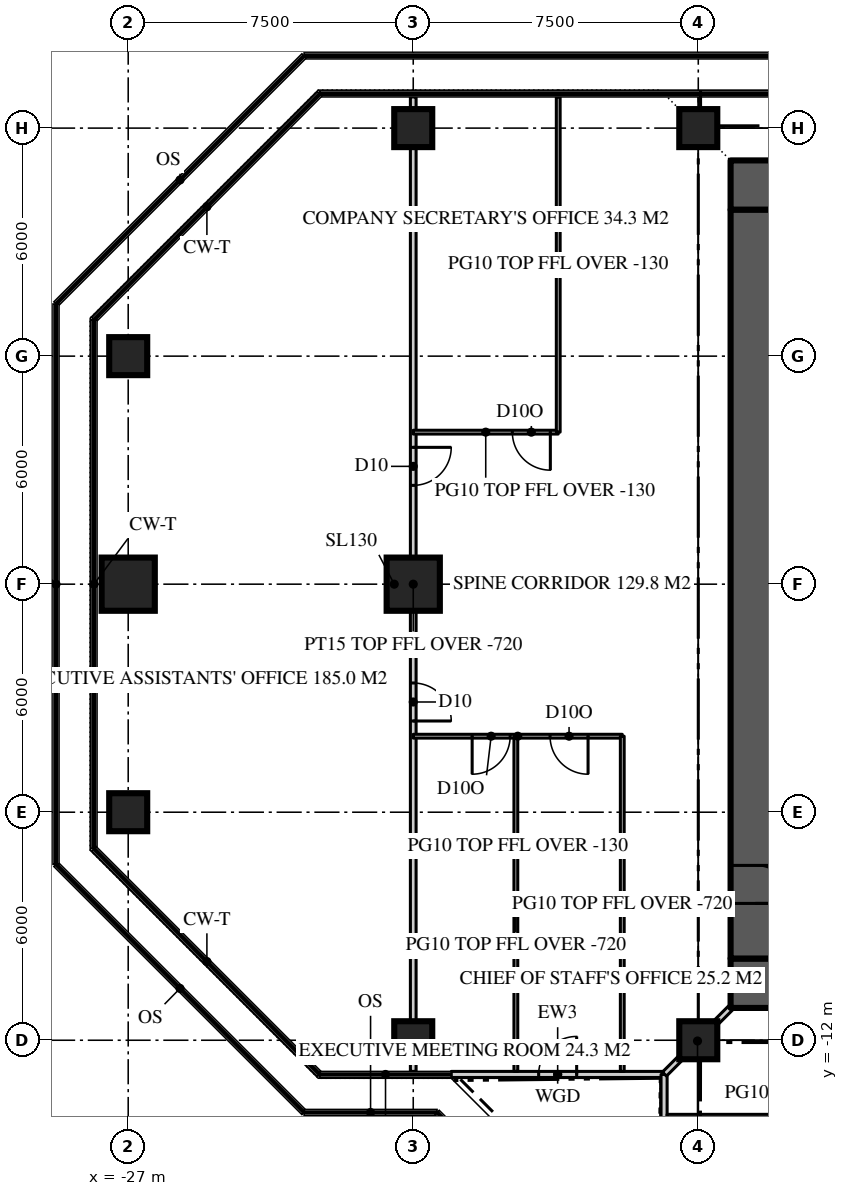
"""IFC4 building model, lengths in metres.
Left out: names, types, materials, properties, quantities, classifications, styles, units other than length and angle.
Written with IfcOpenShell. Run it as: python <this file> out.ifc"""

import sys

from ifc_helpers import new_model, si_unit, direction, frame, frame_2d, origin, origin_2d, place, context, subcontext, project, spatial, rectangle, extrude, element, fill, save


model = new_model("IFC4")
c1 = context("Model", 3, precision=1e-05, world=origin(), true_north=direction((0.0, 1.0)))
c2 = subcontext(c1, "Body", "Model", "MODEL_VIEW")
j1 = project(units=[si_unit("LENGTHUNIT", "METRE"), si_unit("PLANEANGLEUNIT", "RADIAN")], contexts=[c1])
p1 = place(None, origin())
s1 = spatial("IfcSite", under=j1, at=p1, CompositionType="ELEMENT")
p2 = place(p1, origin())
s2 = spatial("IfcBuilding", under=s1, at=p2, CompositionType="ELEMENT")
p3 = place(p2, frame((0.0, 0.0, 294.6)))
s3 = spatial("IfcBuildingStorey", under=s2, at=p3, CompositionType="ELEMENT", Elevation=294.6)
p4 = place(p3, frame((-11.15, 10.5, 0.0), z_axis=(0.0, 0.0, 1.0), x_axis=(1.0, 0.0, 0.0)))
e1 = element("IfcWall", 1, at=p4, inside=s3, PredefinedType="SHEAR", context=c2, shape_type="SweptSolid", body=[
    extrude(rectangle(XDim=22.3, YDim=1.3, at=frame_2d((11.15, 0.0))), origin(), (0.0, 0.0, 1.0), 3.9),
])
p5 = place(p4, frame((4.25, 0.0, 0.0)))
e2 = element("IfcOpeningElement", 2, at=p5, cuts=e1, PredefinedType="OPENING", context=c2, shape_type="SweptSolid", body=[
    extrude(rectangle(XDim=1.8, YDim=2.2, at=frame_2d((0.9, 1.1))), frame((0.0, 0.66, 0.0), z_axis=(0.0, -1.0, 0.0), x_axis=(1.0, 0.0, 0.0)), (0.0, 0.0, 1.0), 1.32),
])
p6 = place(p4, frame((16.25, 0.0, 0.0)))
e3 = element("IfcOpeningElement", 3, at=p6, cuts=e1, PredefinedType="OPENING", context=c2, shape_type="SweptSolid", body=[
    extrude(rectangle(XDim=1.8, YDim=2.2, at=frame_2d((0.9, 1.1))), frame((0.0, 0.66, 0.0), z_axis=(0.0, -1.0, 0.0), x_axis=(1.0, 0.0, 0.0)), (0.0, 0.0, 1.0), 1.32),
])
p7 = place(p3, frame((11.15, -10.5, 0.0), z_axis=(0.0, 0.0, 1.0), x_axis=(-1.0, 0.0, 0.0)))
e4 = element("IfcWall", 4, at=p7, inside=s3, PredefinedType="SHEAR", context=c2, shape_type="SweptSolid", body=[
    extrude(rectangle(XDim=22.3, YDim=1.3, at=frame_2d((11.15, 0.0))), origin(), (0.0, 0.0, 1.0), 3.9),
])
p8 = place(p7, frame((16.25, 0.0, 0.0)))
e5 = element("IfcOpeningElement", 5, at=p8, cuts=e4, PredefinedType="OPENING", context=c2, shape_type="SweptSolid", body=[
    extrude(rectangle(XDim=1.8, YDim=2.2, at=frame_2d((0.9, 1.1))), frame((0.0, 0.66, 0.0), z_axis=(0.0, -1.0, 0.0), x_axis=(1.0, 0.0, 0.0)), (0.0, 0.0, 1.0), 1.32),
])
p9 = place(p7, frame((4.25, 0.0, 0.0)))
e6 = element("IfcOpeningElement", 6, at=p9, cuts=e4, PredefinedType="OPENING", context=c2, shape_type="SweptSolid", body=[
    extrude(rectangle(XDim=1.8, YDim=2.2, at=frame_2d((0.9, 1.1))), frame((0.0, 0.66, 0.0), z_axis=(0.0, -1.0, 0.0), x_axis=(1.0, 0.0, 0.0)), (0.0, 0.0, 1.0), 1.32),
])
p10 = place(p3, frame((-10.5, 9.85, 0.0), z_axis=(0.0, 0.0, 1.0), x_axis=(0.0, -1.0, 0.0)))
e7 = element("IfcWall", 7, at=p10, inside=s3, PredefinedType="SHEAR", context=c2, shape_type="SweptSolid", body=[
    extrude(rectangle(XDim=19.7, YDim=1.3, at=frame_2d((9.85, 0.0))), origin(), (0.0, 0.0, 1.0), 3.9),
])
p11 = place(p10, frame((17.25, 0.0, 0.0)))
e8 = element("IfcOpeningElement", 8, at=p11, cuts=e7, PredefinedType="OPENING", context=c2, shape_type="SweptSolid", body=[
    extrude(rectangle(XDim=1.0, YDim=2.2, at=frame_2d((0.5, 1.1))), frame((0.0, 0.66, 0.0), z_axis=(0.0, -1.0, 0.0), x_axis=(1.0, 0.0, 0.0)), (0.0, 0.0, 1.0), 1.32),
])
for number, where, z_axis, x_axis in (
    (9, (-19.5, -12.0, 0.0), (0.0, 0.0, 1.0), (1.0, 0.0, 0.0)),
    (10, (-12.0, -12.0, 0.0), (0.0, 0.0, 1.0), (1.0, 0.0, 0.0)),
    (11, (-27.0, -6.0, 0.0), (0.0, 0.0, 1.0), (1.0, 0.0, 0.0)),
):
    element("IfcColumn", number, at=place(p3, frame(where, z_axis=z_axis, x_axis=x_axis)), inside=s3, PredefinedType="COLUMN", context=c2, shape_type="SweptSolid", body=[
        extrude(rectangle(XDim=1.0, YDim=1.0, at=origin_2d()), origin(), (0.0, 0.0, 1.0), 3.9),
    ])
for number, where, z_axis, x_axis in (
    (12, (-27.0, 0.0, 0.0), (0.0, 0.0, 1.0), (1.0, 0.0, 0.0)),
    (13, (-19.5, 0.0, 0.0), (0.0, 0.0, 1.0), (1.0, 0.0, 0.0)),
):
    element("IfcColumn", number, at=place(p3, frame(where, z_axis=z_axis, x_axis=x_axis)), inside=s3, PredefinedType="COLUMN", context=c2, shape_type="SweptSolid", body=[
        extrude(rectangle(XDim=1.4, YDim=1.4, at=origin_2d()), origin(), (0.0, 0.0, 1.0), 3.9),
    ])
for number, where, z_axis, x_axis in (
    (14, (-27.0, 6.0, 0.0), (0.0, 0.0, 1.0), (1.0, 0.0, 0.0)),
    (15, (-19.5, 12.0, 0.0), (0.0, 0.0, 1.0), (1.0, 0.0, 0.0)),
    (16, (-12.0, 12.0, 0.0), (0.0, 0.0, 1.0), (1.0, 0.0, 0.0)),
):
    element("IfcColumn", number, at=place(p3, frame(where, z_axis=z_axis, x_axis=x_axis)), inside=s3, PredefinedType="COLUMN", context=c2, shape_type="SweptSolid", body=[
        extrude(rectangle(XDim=1.0, YDim=1.0, at=origin_2d()), origin(), (0.0, 0.0, 1.0), 3.9),
    ])
p12 = place(p3, frame((-18.5, -12.9, 0.0), z_axis=(0.0, 0.0, 1.0), x_axis=(1.0, 0.0, 0.0)))
e17 = element("IfcWall", 17, at=p12, inside=s3, PredefinedType="SOLIDWALL", context=c2, shape_type="SweptSolid", body=[
    extrude(rectangle(XDim=5.6, YDim=0.16, at=frame_2d((2.8, 0.0))), origin(), (0.0, 0.0, 1.0), 3.77),
])
p13 = place(p12, frame((2.3, 0.0, 0.0)))
e18 = element("IfcOpeningElement", 18, at=p13, cuts=e17, PredefinedType="OPENING", context=c2, shape_type="SweptSolid", body=[
    extrude(rectangle(XDim=1.0, YDim=2.2, at=frame_2d((0.5, 1.1))), frame((0.0, 0.09, 0.0), z_axis=(0.0, -1.0, 0.0), x_axis=(1.0, 0.0, 0.0)), (0.0, 0.0, 1.0), 0.18),
])
p14 = place(p3, frame((-12.9, -12.9, 0.0), z_axis=(0.0, 0.0, 1.0), x_axis=(0.0, -1.0, 0.0)))
e19 = element("IfcWall", 19, at=p14, inside=s3, PredefinedType="SOLIDWALL", context=c2, shape_type="SweptSolid", body=[
    extrude(rectangle(XDim=5.6, YDim=0.16, at=frame_2d((2.8, 0.0))), origin(), (0.0, 0.0, 1.0), 3.77),
])
p15 = place(p3, frame((-19.5, 12.82, 0.0), z_axis=(0.0, 0.0, 1.0), x_axis=(0.0, -1.0, 0.0)))
e20 = element("IfcWall", 20, at=p15, inside=s3, PredefinedType="PARTITIONING", context=c2, shape_type="SweptSolid", body=[
    extrude(rectangle(XDim=25.64, YDim=0.15, at=frame_2d((12.82, 0.0))), origin(), (0.0, 0.0, 1.0), 3.18),
])
p16 = place(p15, frame((15.42, 0.0, 0.0)))
e21 = element("IfcOpeningElement", 21, at=p16, cuts=e20, PredefinedType="OPENING", context=c2, shape_type="SweptSolid", body=[
    extrude(rectangle(XDim=1.0, YDim=2.2, at=frame_2d((0.5, 1.1))), frame((0.0, 0.085, 0.0), z_axis=(0.0, -1.0, 0.0), x_axis=(1.0, 0.0, 0.0)), (0.0, 0.0, 1.0), 0.17),
])
p17 = place(p15, frame((9.22, 0.0, 0.0)))
e22 = element("IfcOpeningElement", 22, at=p17, cuts=e20, PredefinedType="OPENING", context=c2, shape_type="SweptSolid", body=[
    extrude(rectangle(XDim=1.0, YDim=2.2, at=frame_2d((0.5, 1.1))), frame((0.0, 0.085, 0.0), z_axis=(0.0, -1.0, 0.0), x_axis=(1.0, 0.0, 0.0)), (0.0, 0.0, 1.0), 0.17),
])
p18 = place(p3, frame((-14.0, -4.0, 0.0), z_axis=(0.0, 0.0, 1.0), x_axis=(-1.0, 0.0, 0.0)))
e23 = element("IfcWall", 23, at=p18, inside=s3, PredefinedType="PARTITIONING", context=c2, shape_type="SweptSolid", body=[
    extrude(rectangle(XDim=5.5, YDim=0.1, at=frame_2d((2.75, 0.0))), origin(), (0.0, 0.0, 1.0), 3.77),
])
p19 = place(p18, frame((0.9, 0.0, 0.0)))
e24 = element("IfcOpeningElement", 24, at=p19, cuts=e23, PredefinedType="OPENING", context=c2, shape_type="SweptSolid", body=[
    extrude(rectangle(XDim=1.0, YDim=2.2, at=frame_2d((0.5, 1.1))), frame((0.0, 0.06, 0.0), z_axis=(0.0, -1.0, 0.0), x_axis=(1.0, 0.0, 0.0)), (0.0, 0.0, 1.0), 0.12),
])
p20 = place(p18, frame((2.95, 0.0, 0.0)))
e25 = element("IfcOpeningElement", 25, at=p20, cuts=e23, PredefinedType="OPENING", context=c2, shape_type="SweptSolid", body=[
    extrude(rectangle(XDim=1.0, YDim=2.2, at=frame_2d((0.5, 1.1))), frame((0.0, 0.06, 0.0), z_axis=(0.0, -1.0, 0.0), x_axis=(1.0, 0.0, 0.0)), (0.0, 0.0, 1.0), 0.12),
])
for number, where, z_axis, x_axis in (
    (26, (-14.0, -4.0, 0.0), (0.0, 0.0, 1.0), (0.0, -1.0, 0.0)),
    (27, (-16.8, -4.0, 0.0), (0.0, 0.0, 1.0), (0.0, -1.0, 0.0)),
):
    element("IfcWall", number, at=place(p3, frame(where, z_axis=z_axis, x_axis=x_axis)), inside=s3, PredefinedType="PARTITIONING", context=c2, shape_type="SweptSolid", body=[
        extrude(rectangle(XDim=8.82, YDim=0.1, at=frame_2d((4.41, 0.0))), origin(), (0.0, 0.0, 1.0), 3.18),
    ])
p21 = place(p3, frame((-15.685, 4.0, 0.0), z_axis=(0.0, 0.0, 1.0), x_axis=(-1.0, 0.0, 0.0)))
e28 = element("IfcWall", 28, at=p21, inside=s3, PredefinedType="PARTITIONING", context=c2, shape_type="SweptSolid", body=[
    extrude(rectangle(XDim=3.815, YDim=0.1, at=frame_2d((1.907, 0.0))), origin(), (0.0, 0.0, 1.0), 3.77),
])
p22 = place(p21, frame((0.208, 0.0, 0.0)))
e29 = element("IfcOpeningElement", 29, at=p22, cuts=e28, PredefinedType="OPENING", context=c2, shape_type="SweptSolid", body=[
    extrude(rectangle(XDim=1.0, YDim=2.2, at=frame_2d((0.5, 1.1))), frame((0.0, 0.06, 0.0), z_axis=(0.0, -1.0, 0.0), x_axis=(1.0, 0.0, 0.0)), (0.0, 0.0, 1.0), 0.12),
])
p23 = place(p3, frame((-15.685, 4.0, 0.0), z_axis=(0.0, 0.0, 1.0), x_axis=(0.0, 1.0, 0.0)))
e30 = element("IfcWall", 30, at=p23, inside=s3, PredefinedType="PARTITIONING", context=c2, shape_type="SweptSolid", body=[
    extrude(rectangle(XDim=8.82, YDim=0.1, at=frame_2d((4.41, 0.0))), origin(), (0.0, 0.0, 1.0), 3.77),
])
p24 = place(p3, frame((-4.0, -14.0, 0.0), z_axis=(0.0, 0.0, 1.0), x_axis=(-1.0, 0.0, 0.0)))
e31 = element("IfcWall", 31, at=p24, inside=s3, PredefinedType="PARTITIONING", context=c2, shape_type="SweptSolid", body=[
    extrude(rectangle(XDim=8.82, YDim=0.1, at=frame_2d((4.41, 0.0))), origin(), (0.0, 0.0, 1.0), 3.18),
])
p25 = place(p3, frame((-11.15, -11.15, 0.0), z_axis=(0.0, 0.0, 1.0), x_axis=(-0.707106781187, -0.707106781187, 0.0)))
e32 = element("IfcWall", 32, at=p25, inside=s3, PredefinedType="PARTITIONING", context=c2, shape_type="SweptSolid", body=[
    extrude(rectangle(XDim=2.461, YDim=0.15, at=frame_2d((1.23, 0.0))), origin(), (0.0, 0.0, 1.0), 3.22),
])
p26 = place(p13, origin())
e33 = element("IfcDoor", 33, at=p26, inside=s3, OperationType="SINGLE_SWING_RIGHT", PredefinedType="DOOR", context=c2, shape_type="SweptSolid", body=[
    extrude(rectangle(XDim=1.0, YDim=2.2, at=frame_2d((0.5, 1.1))), frame((0.0, 0.025, 0.0), z_axis=(0.0, -1.0, 0.0), x_axis=(1.0, 0.0, 0.0)), (0.0, 0.0, 1.0), 0.05),
])
fill(e18, e33)
p27 = place(p11, origin())
e34 = element("IfcDoor", 34, at=p27, inside=s3, OperationType="SINGLE_SWING_RIGHT", PredefinedType="DOOR", context=c2, shape_type="SweptSolid", body=[
    extrude(rectangle(XDim=1.0, YDim=2.2, at=frame_2d((0.5, 1.1))), frame((0.0, 0.025, 0.0), z_axis=(0.0, -1.0, 0.0), x_axis=(1.0, 0.0, 0.0)), (0.0, 0.0, 1.0), 0.05),
])
fill(e8, e34)
p28 = place(p16, origin())
e35 = element("IfcDoor", 35, at=p28, inside=s3, OperationType="SINGLE_SWING_RIGHT", PredefinedType="DOOR", context=c2, shape_type="SweptSolid", body=[
    extrude(rectangle(XDim=1.0, YDim=2.2, at=frame_2d((0.5, 1.1))), frame((0.0, 0.025, 0.0), z_axis=(0.0, -1.0, 0.0), x_axis=(1.0, 0.0, 0.0)), (0.0, 0.0, 1.0), 0.05),
])
fill(e21, e35)
p29 = place(p17, origin())
e36 = element("IfcDoor", 36, at=p29, inside=s3, OperationType="SINGLE_SWING_LEFT", PredefinedType="DOOR", context=c2, shape_type="SweptSolid", body=[
    extrude(rectangle(XDim=1.0, YDim=2.2, at=frame_2d((0.5, 1.1))), frame((0.0, 0.025, 0.0), z_axis=(0.0, -1.0, 0.0), x_axis=(1.0, 0.0, 0.0)), (0.0, 0.0, 1.0), 0.05),
])
fill(e22, e36)
p30 = place(p19, origin())
e37 = element("IfcDoor", 37, at=p30, inside=s3, OperationType="SINGLE_SWING_LEFT", PredefinedType="DOOR", context=c2, shape_type="SweptSolid", body=[
    extrude(rectangle(XDim=1.0, YDim=2.2, at=frame_2d((0.5, 1.1))), frame((0.0, 0.025, 0.0), z_axis=(0.0, -1.0, 0.0), x_axis=(1.0, 0.0, 0.0)), (0.0, 0.0, 1.0), 0.05),
])
fill(e24, e37)
p31 = place(p20, origin())
e38 = element("IfcDoor", 38, at=p31, inside=s3, OperationType="SINGLE_SWING_RIGHT", PredefinedType="DOOR", context=c2, shape_type="SweptSolid", body=[
    extrude(rectangle(XDim=1.0, YDim=2.2, at=frame_2d((0.5, 1.1))), frame((0.0, 0.025, 0.0), z_axis=(0.0, -1.0, 0.0), x_axis=(1.0, 0.0, 0.0)), (0.0, 0.0, 1.0), 0.05),
])
fill(e25, e38)
p32 = place(p22, origin())
e39 = element("IfcDoor", 39, at=p32, inside=s3, OperationType="SINGLE_SWING_LEFT", PredefinedType="DOOR", context=c2, shape_type="SweptSolid", body=[
    extrude(rectangle(XDim=1.0, YDim=2.2, at=frame_2d((0.5, 1.1))), frame((0.0, 0.025, 0.0), z_axis=(0.0, -1.0, 0.0), x_axis=(1.0, 0.0, 0.0)), (0.0, 0.0, 1.0), 0.05),
])
fill(e29, e39)
save(model, sys.argv[1])
